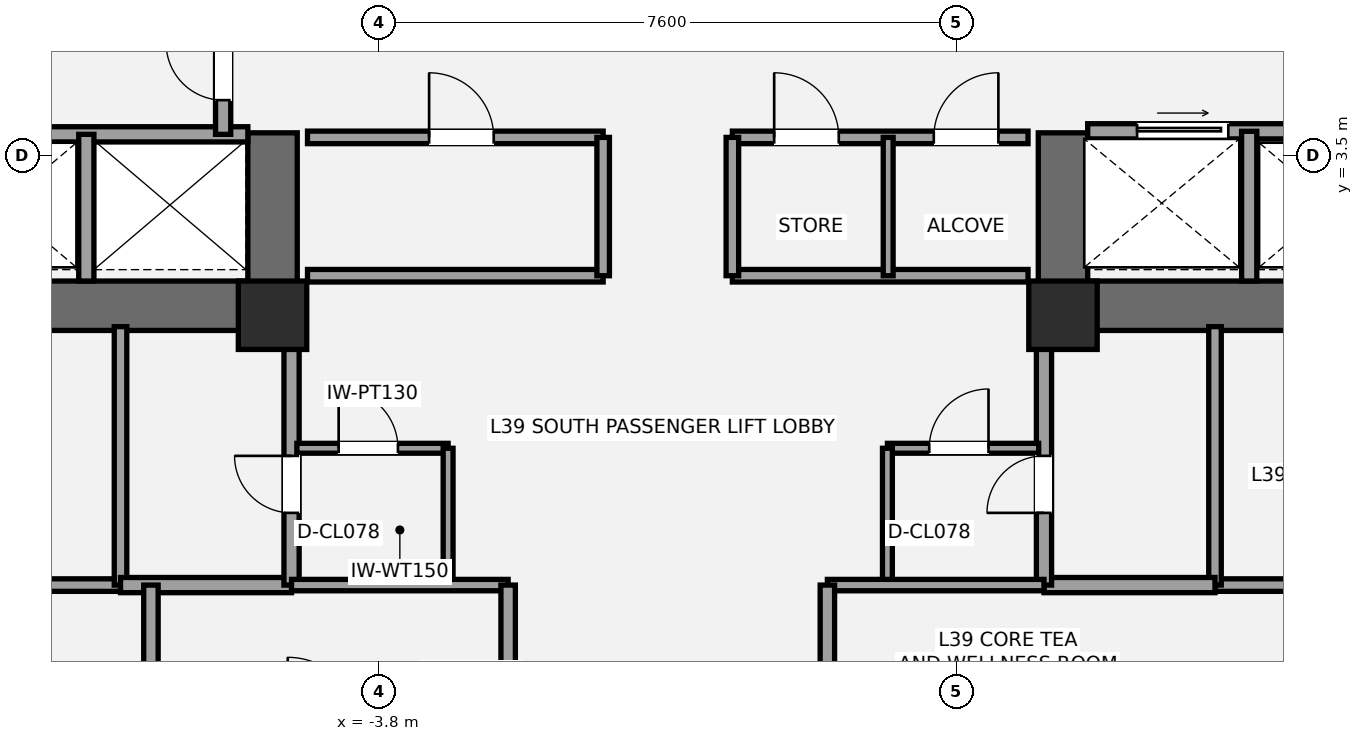
"""IFC4 building model, lengths in metres.
Left out: names, types, materials, properties, quantities, classifications, styles, units other than length and angle.
Written with IfcOpenShell. Run it as: python <this file> out.ifc"""

import sys

from ifc_helpers import new_model, si_unit, direction, frame, frame_2d, origin, origin_2d, place, context, subcontext, project, spatial, rectangle, extrude, element, fill, save


model = new_model("IFC4")
c1 = context("Model", 3, precision=1e-05, world=origin(), true_north=direction((0.0, 1.0)))
c2 = subcontext(c1, "Body", "Model", "MODEL_VIEW")
j1 = project(units=[si_unit("LENGTHUNIT", "METRE"), si_unit("PLANEANGLEUNIT", "RADIAN")], contexts=[c1])
p1 = place(None, origin())
s1 = spatial("IfcSite", under=j1, at=p1, CompositionType="ELEMENT")
p2 = place(p1, origin())
s2 = spatial("IfcBuilding", under=s1, at=p2, CompositionType="ELEMENT")
p3 = place(p2, frame((0.0, 0.0, 147.0)))
s3 = spatial("IfcBuildingStorey", under=s2, at=p3, CompositionType="ELEMENT", Elevation=147.0)
p4 = place(p3, frame((-4.875, 1.525, 0.0), z_axis=(0.0, 0.0, 1.0), x_axis=(-1.0, 0.0, 0.0)))
e1 = element("IfcWall", 1, at=p4, inside=s3, PredefinedType="SHEAR", context=c2, shape_type="SweptSolid", body=[
    extrude(rectangle(XDim=8.925, YDim=0.65, at=frame_2d((4.462, 0.0))), origin(), (0.0, 0.0, 1.0), 3.2),
])
p5 = place(p4, frame((5.425, 0.0, 0.0)))
e2 = element("IfcOpeningElement", 2, at=p5, cuts=e1, PredefinedType="OPENING", context=c2, shape_type="SweptSolid", body=[
    extrude(rectangle(XDim=1.05, YDim=2.15, at=frame_2d((0.525, 1.075))), frame((0.0, 0.335, 0.0), z_axis=(0.0, -1.0, 0.0), x_axis=(1.0, 0.0, 0.0)), (0.0, 0.0, 1.0), 0.67),
])
p6 = place(p4, frame((3.755, 0.0, 0.0)))
e3 = element("IfcOpeningElement", 3, at=p6, cuts=e1, PredefinedType="OPENING", context=c2, shape_type="SweptSolid", body=[
    extrude(rectangle(XDim=1.1, YDim=2.2, at=frame_2d((0.55, 1.1))), frame((0.0, 0.335, 0.0), z_axis=(0.0, -1.0, 0.0), x_axis=(1.0, 0.0, 0.0)), (0.0, 0.0, 1.0), 0.67),
])
p7 = place(p3, frame((-5.2, 1.2, 0.0), z_axis=(0.0, 0.0, 1.0), x_axis=(0.0, 1.0, 0.0)))
e4 = element("IfcWall", 4, at=p7, inside=s3, PredefinedType="SHEAR", context=c2, shape_type="SweptSolid", body=[
    extrude(rectangle(XDim=2.6, YDim=0.65, at=frame_2d((1.3, 0.0))), origin(), (0.0, 0.0, 1.0), 3.2),
])
p8 = place(p3, frame((13.8, 1.525, 0.0), z_axis=(0.0, 0.0, 1.0), x_axis=(-1.0, 0.0, 0.0)))
e5 = element("IfcWall", 5, at=p8, inside=s3, PredefinedType="SHEAR", context=c2, shape_type="SweptSolid", body=[
    extrude(rectangle(XDim=8.925, YDim=0.65, at=frame_2d((4.462, 0.0))), origin(), (0.0, 0.0, 1.0), 3.2),
])
p9 = place(p8, frame((2.45, 0.0, 0.0)))
e6 = element("IfcOpeningElement", 6, at=p9, cuts=e5, PredefinedType="OPENING", context=c2, shape_type="SweptSolid", body=[
    extrude(rectangle(XDim=1.05, YDim=2.15, at=frame_2d((0.525, 1.075))), frame((0.0, 0.335, 0.0), z_axis=(0.0, -1.0, 0.0), x_axis=(1.0, 0.0, 0.0)), (0.0, 0.0, 1.0), 0.67),
])
p10 = place(p8, frame((4.45, 0.0, 0.0)))
e7 = element("IfcOpeningElement", 7, at=p10, cuts=e5, PredefinedType="OPENING", context=c2, shape_type="SweptSolid", body=[
    extrude(rectangle(XDim=1.1, YDim=2.2, at=frame_2d((0.55, 1.1))), frame((0.0, 0.335, 0.0), z_axis=(0.0, -1.0, 0.0), x_axis=(1.0, 0.0, 0.0)), (0.0, 0.0, 1.0), 0.67),
])
p11 = place(p3, frame((5.2, 1.2, 0.0), z_axis=(0.0, 0.0, 1.0), x_axis=(0.0, 1.0, 0.0)))
e8 = element("IfcWall", 8, at=p11, inside=s3, PredefinedType="SHEAR", context=c2, shape_type="SweptSolid", body=[
    extrude(rectangle(XDim=2.6, YDim=0.65, at=frame_2d((1.3, 0.0))), origin(), (0.0, 0.0, 1.0), 3.2),
])
for number, where, z_axis, x_axis in (
    (9, (-5.2, 1.4, 0.0), (0.0, 0.0, 1.0), (1.0, 0.0, 0.0)),
    (10, (5.2, 1.4, 0.0), (0.0, 0.0, 1.0), (1.0, 0.0, 0.0)),
):
    element("IfcColumn", number, at=place(p3, frame(where, z_axis=z_axis, x_axis=x_axis)), inside=s3, PredefinedType="COLUMN", context=c2, shape_type="SweptSolid", body=[
        extrude(rectangle(XDim=0.9, YDim=0.9, at=origin_2d()), origin(), (0.0, 0.0, 1.0), 3.2),
    ])
p12 = place(p3, frame((-13.45, -2.15, 0.0), z_axis=(0.0, 0.0, 1.0), x_axis=(1.0, 0.0, 0.0)))
e11 = element("IfcWall", 11, at=p12, inside=s3, PredefinedType="PARTITIONING", context=c2, shape_type="SweptSolid", body=[
    extrude(rectangle(XDim=6.25, YDim=0.165, at=frame_2d((3.125, 0.0))), origin(), (0.0, 0.0, 1.0), 2.473),
])
p13 = place(p3, frame((-7.2, -2.15, 0.0), z_axis=(0.0, 0.0, 1.0), x_axis=(0.0, 1.0, 0.0)))
e12 = element("IfcWall", 12, at=p13, inside=s3, PredefinedType="PARTITIONING", context=c2, shape_type="SweptSolid", body=[
    extrude(rectangle(XDim=3.4, YDim=0.165, at=frame_2d((1.7, 0.0))), origin(), (0.0, 0.0, 1.0), 2.473),
])
p14 = place(p3, frame((-7.2, -2.15, 0.0), z_axis=(0.0, 0.0, 1.0), x_axis=(1.0, 0.0, 0.0)))
e13 = element("IfcWall", 13, at=p14, inside=s3, PredefinedType="SOLIDWALL", context=c2, shape_type="SweptSolid", body=[
    extrude(rectangle(XDim=2.25, YDim=0.2, at=frame_2d((1.125, 0.0))), origin(), (0.0, 0.0, 1.0), 3.02),
])
p15 = place(p3, frame((-4.95, -2.15, 0.0), z_axis=(0.0, 0.0, 1.0), x_axis=(0.0, 1.0, 0.0)))
e14 = element("IfcWall", 14, at=p15, inside=s3, PredefinedType="SOLIDWALL", context=c2, shape_type="SweptSolid", body=[
    extrude(rectangle(XDim=3.4, YDim=0.2, at=frame_2d((1.7, 0.0))), origin(), (0.0, 0.0, 1.0), 2.473),
])
p16 = place(p15, frame((0.95, 0.0, 0.0)))
e15 = element("IfcOpeningElement", 15, at=p16, cuts=e14, PredefinedType="OPENING", context=c2, shape_type="SweptSolid", body=[
    extrude(rectangle(XDim=0.75, YDim=2.1, at=frame_2d((0.375, 1.05))), frame((0.0, 0.11, 0.0), z_axis=(0.0, -1.0, 0.0), x_axis=(1.0, 0.0, 0.0)), (0.0, 0.0, 1.0), 0.22),
])
p17 = place(p3, frame((7.2, -2.15, 0.0), z_axis=(0.0, 0.0, 1.0), x_axis=(1.0, 0.0, 0.0)))
e16 = element("IfcWall", 16, at=p17, inside=s3, PredefinedType="PARTITIONING", context=c2, shape_type="SweptSolid", body=[
    extrude(rectangle(XDim=6.25, YDim=0.165, at=frame_2d((3.125, 0.0))), origin(), (0.0, 0.0, 1.0), 3.02),
])
p18 = place(p3, frame((7.2, -2.15, 0.0), z_axis=(0.0, 0.0, 1.0), x_axis=(0.0, 1.0, 0.0)))
e17 = element("IfcWall", 17, at=p18, inside=s3, PredefinedType="PARTITIONING", context=c2, shape_type="SweptSolid", body=[
    extrude(rectangle(XDim=3.4, YDim=0.165, at=frame_2d((1.7, 0.0))), origin(), (0.0, 0.0, 1.0), 2.473),
])
p19 = place(p3, frame((4.95, -2.15, 0.0), z_axis=(0.0, 0.0, 1.0), x_axis=(1.0, 0.0, 0.0)))
e18 = element("IfcWall", 18, at=p19, inside=s3, PredefinedType="SOLIDWALL", context=c2, shape_type="SweptSolid", body=[
    extrude(rectangle(XDim=2.25, YDim=0.2, at=frame_2d((1.125, 0.0))), origin(), (0.0, 0.0, 1.0), 3.02),
])
p20 = place(p3, frame((4.95, -2.15, 0.0), z_axis=(0.0, 0.0, 1.0), x_axis=(0.0, 1.0, 0.0)))
e19 = element("IfcWall", 19, at=p20, inside=s3, PredefinedType="SOLIDWALL", context=c2, shape_type="SweptSolid", body=[
    extrude(rectangle(XDim=3.4, YDim=0.2, at=frame_2d((1.7, 0.0))), origin(), (0.0, 0.0, 1.0), 2.473),
])
p21 = place(p20, frame((0.95, 0.0, 0.0)))
e20 = element("IfcOpeningElement", 20, at=p21, cuts=e19, PredefinedType="OPENING", context=c2, shape_type="SweptSolid", body=[
    extrude(rectangle(XDim=0.75, YDim=2.1, at=frame_2d((0.375, 1.05))), frame((0.0, 0.11, 0.0), z_axis=(0.0, -1.0, 0.0), x_axis=(1.0, 0.0, 0.0)), (0.0, 0.0, 1.0), 0.22),
])
p22 = place(p3, frame((-4.88, -0.35, 0.0), z_axis=(0.0, 0.0, 1.0), x_axis=(1.0, 0.0, 0.0)))
e21 = element("IfcWall", 21, at=p22, inside=s3, PredefinedType="PARTITIONING", context=c2, shape_type="SweptSolid", body=[
    extrude(rectangle(XDim=1.99, YDim=0.13, at=frame_2d((0.995, 0.0))), origin(), (0.0, 0.0, 1.0), 3.02),
])
p23 = place(p22, frame((0.55, 0.0, 0.0)))
e22 = element("IfcOpeningElement", 22, at=p23, cuts=e21, PredefinedType="OPENING", context=c2, shape_type="SweptSolid", body=[
    extrude(rectangle(XDim=0.78, YDim=2.1, at=frame_2d((0.39, 1.05))), frame((0.0, 0.075, 0.0), z_axis=(0.0, -1.0, 0.0), x_axis=(1.0, 0.0, 0.0)), (0.0, 0.0, 1.0), 0.15),
])
p24 = place(p3, frame((-2.89, -2.15, 0.0), z_axis=(0.0, 0.0, 1.0), x_axis=(0.0, 1.0, 0.0)))
e23 = element("IfcWall", 23, at=p24, inside=s3, PredefinedType="PARTITIONING", context=c2, shape_type="SweptSolid", body=[
    extrude(rectangle(XDim=1.8, YDim=0.13, at=frame_2d((0.9, 0.0))), origin(), (0.0, 0.0, 1.0), 3.02),
])
p25 = place(p3, frame((2.89, -0.35, 0.0), z_axis=(0.0, 0.0, 1.0), x_axis=(1.0, 0.0, 0.0)))
e24 = element("IfcWall", 24, at=p25, inside=s3, PredefinedType="PARTITIONING", context=c2, shape_type="SweptSolid", body=[
    extrude(rectangle(XDim=1.99, YDim=0.13, at=frame_2d((0.995, 0.0))), origin(), (0.0, 0.0, 1.0), 3.02),
])
p26 = place(p25, frame((0.55, 0.0, 0.0)))
e25 = element("IfcOpeningElement", 25, at=p26, cuts=e24, PredefinedType="OPENING", context=c2, shape_type="SweptSolid", body=[
    extrude(rectangle(XDim=0.78, YDim=2.1, at=frame_2d((0.39, 1.05))), frame((0.0, 0.075, 0.0), z_axis=(0.0, -1.0, 0.0), x_axis=(1.0, 0.0, 0.0)), (0.0, 0.0, 1.0), 0.15),
])
p27 = place(p3, frame((2.89, -2.15, 0.0), z_axis=(0.0, 0.0, 1.0), x_axis=(0.0, 1.0, 0.0)))
e26 = element("IfcWall", 26, at=p27, inside=s3, PredefinedType="PARTITIONING", context=c2, shape_type="SweptSolid", body=[
    extrude(rectangle(XDim=1.8, YDim=0.13, at=frame_2d((0.9, 0.0))), origin(), (0.0, 0.0, 1.0), 3.02),
])
p28 = place(p3, frame((-9.78, 3.78, 0.0), z_axis=(0.0, 0.0, 1.0), x_axis=(1.0, 0.0, 0.0)))
e27 = element("IfcWall", 27, at=p28, inside=s3, PredefinedType="SOLIDWALL", context=c2, shape_type="SweptSolid", body=[
    extrude(rectangle(XDim=4.255, YDim=0.2, at=frame_2d((2.127, 0.0))), origin(), (0.0, 0.0, 1.0), 3.02),
])
p29 = place(p3, frame((-7.65, 1.85, 0.0), z_axis=(0.0, 0.0, 1.0), x_axis=(0.0, 1.0, 0.0)))
e28 = element("IfcWall", 28, at=p29, inside=s3, PredefinedType="SOLIDWALL", context=c2, shape_type="SweptSolid", body=[
    extrude(rectangle(XDim=1.93, YDim=0.2, at=frame_2d((0.965, 0.0))), origin(), (0.0, 0.0, 1.0), 3.02),
])
p30 = place(p3, frame((-5.85, 3.78, 0.0), z_axis=(0.0, 0.0, 1.0), x_axis=(0.0, 1.0, 0.0)))
e29 = element("IfcWall", 29, at=p30, inside=s3, PredefinedType="SOLIDWALL", context=c2, shape_type="SweptSolid", body=[
    extrude(rectangle(XDim=1.69, YDim=0.2, at=frame_2d((0.845, 0.0))), origin(), (0.0, 0.0, 1.0), 3.02),
])
p31 = place(p30, frame((0.45, 0.0, 0.0)))
e30 = element("IfcOpeningElement", 30, at=p31, cuts=e29, PredefinedType="OPENING", context=c2, shape_type="SweptSolid", body=[
    extrude(rectangle(XDim=0.75, YDim=2.1, at=frame_2d((0.375, 1.05))), frame((0.0, 0.11, 0.0), z_axis=(0.0, -1.0, 0.0), x_axis=(1.0, 0.0, 0.0)), (0.0, 0.0, 1.0), 0.22),
])
p32 = place(p3, frame((5.525, 3.82, 0.0), z_axis=(0.0, 0.0, 1.0), x_axis=(1.0, 0.0, 0.0)))
e31 = element("IfcWall", 31, at=p32, inside=s3, PredefinedType="SOLIDWALL", context=c2, shape_type="SweptSolid", body=[
    extrude(rectangle(XDim=4.255, YDim=0.2, at=frame_2d((2.127, 0.0))), origin(), (0.0, 0.0, 1.0), 3.02),
])
p33 = place(p32, frame((0.65, 0.0, 0.0)))
e32 = element("IfcOpeningElement", 32, at=p33, cuts=e31, PredefinedType="OPENING", context=c2, shape_type="SweptSolid", body=[
    extrude(rectangle(XDim=1.2, YDim=2.2, at=frame_2d((0.6, 1.1))), frame((0.0, 0.11, 0.0), z_axis=(0.0, -1.0, 0.0), x_axis=(1.0, 0.0, 0.0)), (0.0, 0.0, 1.0), 0.22),
])
p34 = place(p3, frame((7.65, 1.85, 0.0), z_axis=(0.0, 0.0, 1.0), x_axis=(0.0, 1.0, 0.0)))
e33 = element("IfcWall", 33, at=p34, inside=s3, PredefinedType="SOLIDWALL", context=c2, shape_type="SweptSolid", body=[
    extrude(rectangle(XDim=1.97, YDim=0.2, at=frame_2d((0.985, 0.0))), origin(), (0.0, 0.0, 1.0), 3.02),
])
p35 = place(p3, frame((-4.74, 1.92, 0.0), z_axis=(0.0, 0.0, 1.0), x_axis=(1.0, 0.0, 0.0)))
e34 = element("IfcWall", 34, at=p35, inside=s3, PredefinedType="PARTITIONING", context=c2, shape_type="SweptSolid", body=[
    extrude(rectangle(XDim=3.89, YDim=0.165, at=frame_2d((1.945, 0.0))), origin(), (0.0, 0.0, 1.0), 2.16),
])
p36 = place(p3, frame((-4.74, 3.74, 0.0), z_axis=(0.0, 0.0, 1.0), x_axis=(1.0, 0.0, 0.0)))
e35 = element("IfcWall", 35, at=p36, inside=s3, PredefinedType="PARTITIONING", context=c2, shape_type="SweptSolid", body=[
    extrude(rectangle(XDim=3.89, YDim=0.165, at=frame_2d((1.945, 0.0))), origin(), (0.0, 0.0, 1.0), 3.02),
])
p37 = place(p36, frame((1.6, 0.0, 0.0)))
e36 = element("IfcOpeningElement", 36, at=p37, cuts=e35, PredefinedType="OPENING", context=c2, shape_type="SweptSolid", body=[
    extrude(rectangle(XDim=0.85, YDim=2.1, at=frame_2d((0.425, 1.05))), frame((0.0, 0.093, 0.0), z_axis=(0.0, -1.0, 0.0), x_axis=(1.0, 0.0, 0.0)), (0.0, 0.0, 1.0), 0.185),
])
p38 = place(p3, frame((-0.85, 1.92, 0.0), z_axis=(0.0, 0.0, 1.0), x_axis=(0.0, 1.0, 0.0)))
e37 = element("IfcWall", 37, at=p38, inside=s3, PredefinedType="PARTITIONING", context=c2, shape_type="SweptSolid", body=[
    extrude(rectangle(XDim=1.82, YDim=0.165, at=frame_2d((0.91, 0.0))), origin(), (0.0, 0.0, 1.0), 3.02),
])
p39 = place(p3, frame((0.85, 1.92, 0.0), z_axis=(0.0, 0.0, 1.0), x_axis=(1.0, 0.0, 0.0)))
e38 = element("IfcWall", 38, at=p39, inside=s3, PredefinedType="PARTITIONING", context=c2, shape_type="SweptSolid", body=[
    extrude(rectangle(XDim=3.89, YDim=0.165, at=frame_2d((1.945, 0.0))), origin(), (0.0, 0.0, 1.0), 2.16),
])
p40 = place(p3, frame((0.85, 3.74, 0.0), z_axis=(0.0, 0.0, 1.0), x_axis=(1.0, 0.0, 0.0)))
e39 = element("IfcWall", 39, at=p40, inside=s3, PredefinedType="PARTITIONING", context=c2, shape_type="SweptSolid", body=[
    extrude(rectangle(XDim=3.89, YDim=0.165, at=frame_2d((1.945, 0.0))), origin(), (0.0, 0.0, 1.0), 3.02),
])
p41 = place(p40, frame((0.55, 0.0, 0.0)))
e40 = element("IfcOpeningElement", 40, at=p41, cuts=e39, PredefinedType="OPENING", context=c2, shape_type="SweptSolid", body=[
    extrude(rectangle(XDim=0.85, YDim=2.1, at=frame_2d((0.425, 1.05))), frame((0.0, 0.093, 0.0), z_axis=(0.0, -1.0, 0.0), x_axis=(1.0, 0.0, 0.0)), (0.0, 0.0, 1.0), 0.185),
])
p42 = place(p40, frame((2.65, 0.0, 0.0)))
e41 = element("IfcOpeningElement", 41, at=p42, cuts=e39, PredefinedType="OPENING", context=c2, shape_type="SweptSolid", body=[
    extrude(rectangle(XDim=0.85, YDim=2.1, at=frame_2d((0.425, 1.05))), frame((0.0, 0.093, 0.0), z_axis=(0.0, -1.0, 0.0), x_axis=(1.0, 0.0, 0.0)), (0.0, 0.0, 1.0), 0.185),
])
p43 = place(p3, frame((0.85, 1.92, 0.0), z_axis=(0.0, 0.0, 1.0), x_axis=(0.0, 1.0, 0.0)))
e42 = element("IfcWall", 42, at=p43, inside=s3, PredefinedType="PARTITIONING", context=c2, shape_type="SweptSolid", body=[
    extrude(rectangle(XDim=1.82, YDim=0.165, at=frame_2d((0.91, 0.0))), origin(), (0.0, 0.0, 1.0), 3.02),
])
p44 = place(p3, frame((2.9, 1.92, 0.0), z_axis=(0.0, 0.0, 1.0), x_axis=(0.0, 1.0, 0.0)))
e43 = element("IfcWall", 43, at=p44, inside=s3, PredefinedType="PARTITIONING", context=c2, shape_type="SweptSolid", body=[
    extrude(rectangle(XDim=1.82, YDim=0.13, at=frame_2d((0.91, 0.0))), origin(), (0.0, 0.0, 1.0), 3.02),
])
p45 = place(p3, frame((-4.95, -2.15, 0.0), z_axis=(0.0, 0.0, 1.0), x_axis=(1.0, 0.0, 0.0)))
e44 = element("IfcWall", 44, at=p45, inside=s3, PredefinedType="PLUMBINGWALL", context=c2, shape_type="SweptSolid", body=[
    extrude(rectangle(XDim=2.85, YDim=0.15, at=frame_2d((1.425, 0.0))), origin(), (0.0, 0.0, 1.0), 3.02),
])
p46 = place(p3, frame((-6.8, -4.05, 0.0), z_axis=(0.0, 0.0, 1.0), x_axis=(0.0, 1.0, 0.0)))
e45 = element("IfcWall", 45, at=p46, inside=s3, PredefinedType="PLUMBINGWALL", context=c2, shape_type="SweptSolid", body=[
    extrude(rectangle(XDim=1.9, YDim=0.19, at=frame_2d((0.95, 0.0))), origin(), (0.0, 0.0, 1.0), 2.473),
])
p47 = place(p3, frame((-2.1, -4.05, 0.0), z_axis=(0.0, 0.0, 1.0), x_axis=(0.0, 1.0, 0.0)))
e46 = element("IfcWall", 46, at=p47, inside=s3, PredefinedType="PLUMBINGWALL", context=c2, shape_type="SweptSolid", body=[
    extrude(rectangle(XDim=1.9, YDim=0.19, at=frame_2d((0.95, 0.0))), origin(), (0.0, 0.0, 1.0), 3.02),
])
p48 = place(p3, frame((2.1, -2.15, 0.0), z_axis=(0.0, 0.0, 1.0), x_axis=(1.0, 0.0, 0.0)))
e47 = element("IfcWall", 47, at=p48, inside=s3, PredefinedType="PLUMBINGWALL", context=c2, shape_type="SweptSolid", body=[
    extrude(rectangle(XDim=2.85, YDim=0.15, at=frame_2d((1.425, 0.0))), origin(), (0.0, 0.0, 1.0), 3.02),
])
p49 = place(p3, frame((2.1, -4.05, 0.0), z_axis=(0.0, 0.0, 1.0), x_axis=(0.0, 1.0, 0.0)))
e48 = element("IfcWall", 48, at=p49, inside=s3, PredefinedType="PLUMBINGWALL", context=c2, shape_type="SweptSolid", body=[
    extrude(rectangle(XDim=1.9, YDim=0.19, at=frame_2d((0.95, 0.0))), origin(), (0.0, 0.0, 1.0), 3.02),
])
p50 = place(p16, origin())
e49 = element("IfcDoor", 49, at=p50, inside=s3, OperationType="SINGLE_SWING_RIGHT", PredefinedType="DOOR", context=c2, shape_type="SweptSolid", body=[
    extrude(rectangle(XDim=0.75, YDim=2.1, at=frame_2d((0.375, 1.05))), frame((0.0, 0.025, 0.0), z_axis=(0.0, -1.0, 0.0), x_axis=(1.0, 0.0, 0.0)), (0.0, 0.0, 1.0), 0.05),
])
fill(e15, e49)
p51 = place(p21, origin())
e50 = element("IfcDoor", 50, at=p51, inside=s3, OperationType="SINGLE_SWING_LEFT", PredefinedType="DOOR", context=c2, shape_type="SweptSolid", body=[
    extrude(rectangle(XDim=0.75, YDim=2.1, at=frame_2d((0.375, 1.05))), frame((0.0, 0.025, 0.0), z_axis=(0.0, -1.0, 0.0), x_axis=(1.0, 0.0, 0.0)), (0.0, 0.0, 1.0), 0.05),
])
fill(e20, e50)
p52 = place(p23, origin())
e51 = element("IfcDoor", 51, at=p52, inside=s3, OperationType="SINGLE_SWING_LEFT", PredefinedType="DOOR", context=c2, shape_type="SweptSolid", body=[
    extrude(rectangle(XDim=0.78, YDim=2.1, at=frame_2d((0.39, 1.05))), frame((0.0, 0.025, 0.0), z_axis=(0.0, -1.0, 0.0), x_axis=(1.0, 0.0, 0.0)), (0.0, 0.0, 1.0), 0.05),
])
fill(e22, e51)
p53 = place(p26, origin())
e52 = element("IfcDoor", 52, at=p53, inside=s3, OperationType="SINGLE_SWING_RIGHT", PredefinedType="DOOR", context=c2, shape_type="SweptSolid", body=[
    extrude(rectangle(XDim=0.78, YDim=2.1, at=frame_2d((0.39, 1.05))), frame((0.0, 0.025, 0.0), z_axis=(0.0, -1.0, 0.0), x_axis=(1.0, 0.0, 0.0)), (0.0, 0.0, 1.0), 0.05),
])
fill(e25, e52)
p54 = place(p31, origin())
e53 = element("IfcDoor", 53, at=p54, inside=s3, OperationType="SINGLE_SWING_RIGHT", PredefinedType="DOOR", context=c2, shape_type="SweptSolid", body=[
    extrude(rectangle(XDim=0.75, YDim=2.1, at=frame_2d((0.375, 1.05))), frame((0.0, 0.025, 0.0), z_axis=(0.0, -1.0, 0.0), x_axis=(1.0, 0.0, 0.0)), (0.0, 0.0, 1.0), 0.05),
])
fill(e30, e53)
p55 = place(p33, origin())
e54 = element("IfcDoor", 54, at=p55, inside=s3, OperationType="SLIDING_TO_RIGHT", PredefinedType="DOOR", context=c2, shape_type="SweptSolid", body=[
    extrude(rectangle(XDim=1.2, YDim=2.2, at=frame_2d((0.6, 1.1))), frame((0.0, 0.025, 0.0), z_axis=(0.0, -1.0, 0.0), x_axis=(1.0, 0.0, 0.0)), (0.0, 0.0, 1.0), 0.05),
])
fill(e32, e54)
p56 = place(p37, origin())
e55 = element("IfcDoor", 55, at=p56, inside=s3, OperationType="SINGLE_SWING_LEFT", PredefinedType="DOOR", context=c2, shape_type="SweptSolid", body=[
    extrude(rectangle(XDim=0.85, YDim=2.1, at=frame_2d((0.425, 1.05))), frame((0.0, 0.025, 0.0), z_axis=(0.0, -1.0, 0.0), x_axis=(1.0, 0.0, 0.0)), (0.0, 0.0, 1.0), 0.05),
])
fill(e36, e55)
p57 = place(p41, origin())
e56 = element("IfcDoor", 56, at=p57, inside=s3, OperationType="SINGLE_SWING_LEFT", PredefinedType="DOOR", context=c2, shape_type="SweptSolid", body=[
    extrude(rectangle(XDim=0.85, YDim=2.1, at=frame_2d((0.425, 1.05))), frame((0.0, 0.025, 0.0), z_axis=(0.0, -1.0, 0.0), x_axis=(1.0, 0.0, 0.0)), (0.0, 0.0, 1.0), 0.05),
])
fill(e40, e56)
p58 = place(p42, origin())
e57 = element("IfcDoor", 57, at=p58, inside=s3, OperationType="SINGLE_SWING_RIGHT", PredefinedType="DOOR", context=c2, shape_type="SweptSolid", body=[
    extrude(rectangle(XDim=0.85, YDim=2.1, at=frame_2d((0.425, 1.05))), frame((0.0, 0.025, 0.0), z_axis=(0.0, -1.0, 0.0), x_axis=(1.0, 0.0, 0.0)), (0.0, 0.0, 1.0), 0.05),
])
fill(e41, e57)
save(model, sys.argv[1])
